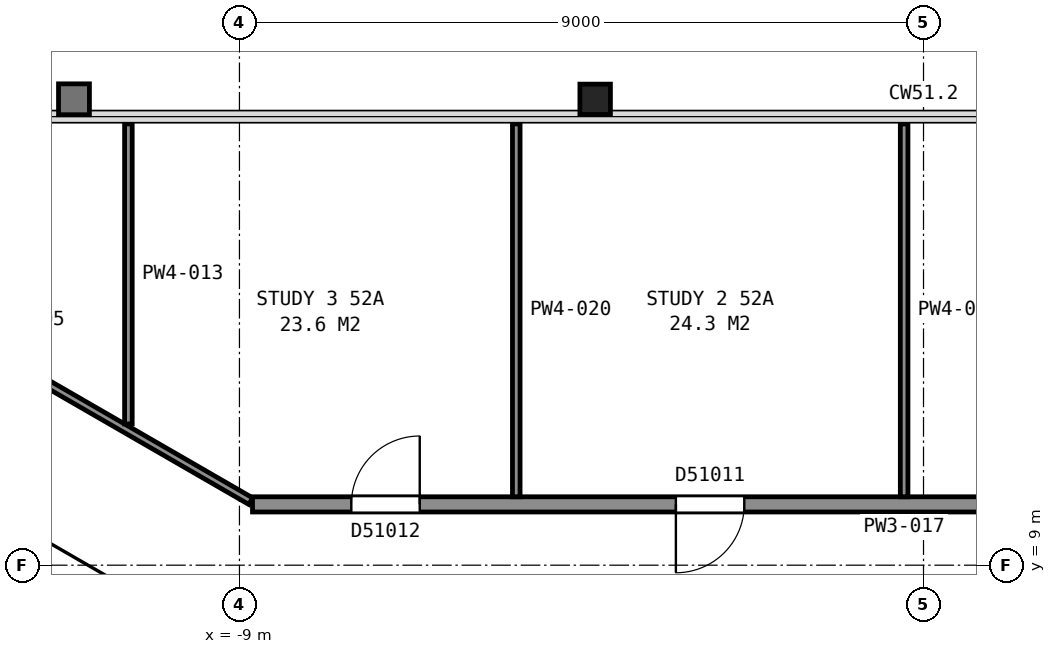
"""IFC4 building model, lengths in metres.
Left out: names, types, materials, properties, quantities, classifications, styles, units other than length and angle.
Written with IfcOpenShell. Run it as: python <this file> out.ifc"""

import sys

from ifc_helpers import new_model, si_unit, direction, frame, frame_2d, origin, origin_2d, place, context, subcontext, project, spatial, rectangle, i_section, extrude, element, fill, save


model = new_model("IFC4")
c1 = context("Model", 3, precision=1e-05, world=origin(), true_north=direction((0.0, 1.0)))
c2 = subcontext(c1, "Body", "Model", "MODEL_VIEW")
j1 = project(units=[si_unit("LENGTHUNIT", "METRE"), si_unit("PLANEANGLEUNIT", "RADIAN")], contexts=[c1])
p1 = place(None, origin())
s1 = spatial("IfcSite", under=j1, at=p1, CompositionType="ELEMENT")
p2 = place(p1, origin())
s2 = spatial("IfcBuilding", under=s1, at=p2, CompositionType="ELEMENT")
p3 = place(p2, frame((0.0, 0.0, 210.1)))
s3 = spatial("IfcBuildingStorey", under=s2, at=p3, CompositionType="ELEMENT", Elevation=210.1)
p4 = place(p3, frame((-4.32, 15.13, 0.0), z_axis=(0.0, 0.0, 1.0), x_axis=(1.0, 0.0, 0.0)))
e1 = element("IfcColumn", 1, at=p4, inside=s3, PredefinedType="COLUMN", context=c2, shape_type="SweptSolid", body=[
    extrude(i_section(OverallWidth=0.401, OverallDepth=0.399, WebThickness=0.025, FlangeThickness=0.04, FilletRadius=0.015, at=origin_2d()), origin(), (0.0, 0.0, 1.0), 3.665),
])
p5 = place(p3, frame((-6.178, 5.299, 0.0), z_axis=(0.0, 0.0, 1.0), x_axis=(-0.866019993635, 0.500009370536, 0.0)))
e2 = element("IfcWall", 2, at=p5, inside=s3, PredefinedType="PARTITIONING", context=c2, shape_type="SweptSolid", body=[
    extrude(rectangle(XDim=9.6, YDim=0.2, at=frame_2d((4.8, 0.0))), origin(), (0.0, 0.0, 1.0), 3.45),
])
p6 = place(p3, frame((-15.921, 13.923, 0.0), z_axis=(0.0, 0.0, 1.0), x_axis=(0.866088973199, -0.499889878377, 0.0)))
e3 = element("IfcWall", 3, at=p6, inside=s3, PredefinedType="PARTITIONING", context=c2, shape_type="SweptSolid", body=[
    extrude(rectangle(XDim=8.163, YDim=0.1, at=frame_2d((4.082, 0.0))), origin(), (0.0, 0.0, 1.0), 2.713),
])
p7 = place(p3, frame((-10.461, 10.859, 0.0), z_axis=(0.0, 0.0, 1.0), x_axis=(0.0, 1.0, 0.0)))
e4 = element("IfcWall", 4, at=p7, inside=s3, PredefinedType="PARTITIONING", context=c2, shape_type="SweptSolid", body=[
    extrude(rectangle(XDim=3.947, YDim=0.1, at=frame_2d((1.974, 0.0))), origin(), (0.0, 0.0, 1.0), 2.713),
])
p8 = place(p3, frame((-8.828, 9.8, 0.0), z_axis=(0.0, 0.0, 1.0), x_axis=(1.0, 0.0, 0.0)))
e5 = element("IfcWall", 5, at=p8, inside=s3, PredefinedType="PARTITIONING", context=c2, shape_type="SweptSolid", body=[
    extrude(rectangle(XDim=17.706, YDim=0.2, at=frame_2d((8.853, 0.0))), origin(), (0.0, 0.0, 1.0), 2.713),
])
p9 = place(p8, frame((14.976, 0.0, 0.0)))
e6 = element("IfcOpeningElement", 6, at=p9, cuts=e5, PredefinedType="OPENING", context=c2, shape_type="SweptSolid", body=[
    extrude(rectangle(XDim=0.9, YDim=2.1, at=frame_2d((0.45, 1.05))), frame((0.0, 0.11, 0.0), z_axis=(0.0, -1.0, 0.0), x_axis=(1.0, 0.0, 0.0)), (0.0, 0.0, 1.0), 0.22),
])
p10 = place(p8, frame((10.673, 0.0, 0.0)))
e7 = element("IfcOpeningElement", 7, at=p10, cuts=e5, PredefinedType="OPENING", context=c2, shape_type="SweptSolid", body=[
    extrude(rectangle(XDim=0.9, YDim=2.1, at=frame_2d((0.45, 1.05))), frame((0.0, 0.11, 0.0), z_axis=(0.0, -1.0, 0.0), x_axis=(1.0, 0.0, 0.0)), (0.0, 0.0, 1.0), 0.22),
])
p11 = place(p8, frame((5.57, 0.0, 0.0)))
e8 = element("IfcOpeningElement", 8, at=p11, cuts=e5, PredefinedType="OPENING", context=c2, shape_type="SweptSolid", body=[
    extrude(rectangle(XDim=0.9, YDim=2.1, at=frame_2d((0.45, 1.05))), frame((0.0, 0.11, 0.0), z_axis=(0.0, -1.0, 0.0), x_axis=(1.0, 0.0, 0.0)), (0.0, 0.0, 1.0), 0.22),
])
p12 = place(p8, frame((1.3, 0.0, 0.0)))
e9 = element("IfcOpeningElement", 9, at=p12, cuts=e5, PredefinedType="OPENING", context=c2, shape_type="SweptSolid", body=[
    extrude(rectangle(XDim=0.9, YDim=2.1, at=frame_2d((0.45, 1.05))), frame((0.0, 0.11, 0.0), z_axis=(0.0, -1.0, 0.0), x_axis=(1.0, 0.0, 0.0)), (0.0, 0.0, 1.0), 0.22),
])
for number, where, z_axis, x_axis in (
    (10, (-5.358, 9.9, 0.0), (0.0, 0.0, 1.0), (0.0, 1.0, 0.0)),
    (11, (-0.255, 9.9, 0.0), (0.0, 0.0, 1.0), (0.0, 1.0, 0.0)),
):
    element("IfcWall", number, at=place(p3, frame(where, z_axis=z_axis, x_axis=x_axis)), inside=s3, PredefinedType="PARTITIONING", context=c2, shape_type="SweptSolid", body=[
        extrude(rectangle(XDim=4.906, YDim=0.1, at=frame_2d((2.453, 0.0))), origin(), (0.0, 0.0, 1.0), 2.713),
    ])
p13 = place(p11, origin())
e12 = element("IfcDoor", 12, at=p13, inside=s3, OperationType="SINGLE_SWING_LEFT", PredefinedType="DOOR", context=c2, shape_type="SweptSolid", body=[
    extrude(rectangle(XDim=0.9, YDim=2.1, at=frame_2d((0.45, 1.05))), frame((0.0, 0.025, 0.0), z_axis=(0.0, -1.0, 0.0), x_axis=(1.0, 0.0, 0.0)), (0.0, 0.0, 1.0), 0.05),
])
fill(e8, e12)
p14 = place(p12, origin())
e13 = element("IfcDoor", 13, at=p14, inside=s3, OperationType="SINGLE_SWING_RIGHT", PredefinedType="DOOR", context=c2, shape_type="SweptSolid", body=[
    extrude(rectangle(XDim=0.9, YDim=2.1, at=frame_2d((0.45, 1.05))), frame((0.0, 0.025, 0.0), z_axis=(0.0, -1.0, 0.0), x_axis=(1.0, 0.0, 0.0)), (0.0, 0.0, 1.0), 0.05),
])
fill(e9, e13)
save(model, sys.argv[1])
